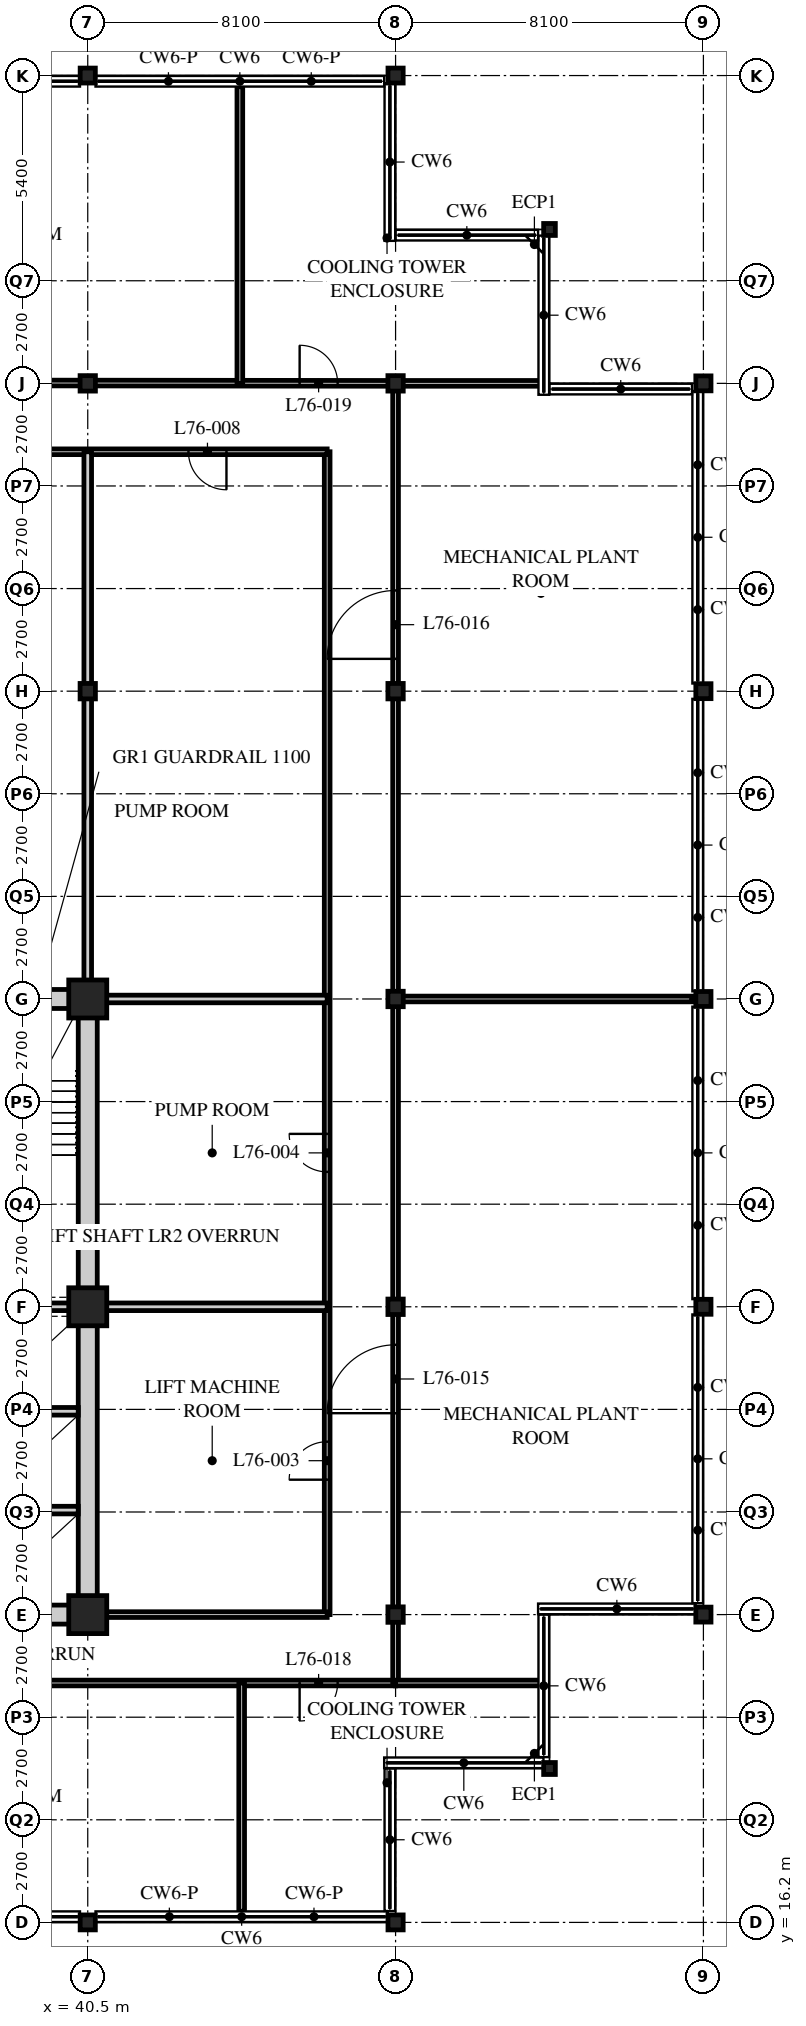
"""IFC4 building model, lengths in metres.
Left out: names, types, materials, properties, quantities, classifications, styles, units other than length and angle.
Written with IfcOpenShell. Run it as: python <this file> out.ifc"""

import sys

from ifc_helpers import new_model, si_unit, direction, frame, frame_2d, origin, origin_2d, place, context, subcontext, project, spatial, rectangle, hollow_rectangle, i_section, extrude, element, fill, save


model = new_model("IFC4")
c1 = context("Model", 3, precision=1e-05, world=origin(), true_north=direction((0.0, 1.0)))
c2 = subcontext(c1, "Body", "Model", "MODEL_VIEW")
j1 = project(units=[si_unit("LENGTHUNIT", "METRE"), si_unit("PLANEANGLEUNIT", "RADIAN")], contexts=[c1])
p1 = place(None, origin())
s1 = spatial("IfcSite", under=j1, at=p1, CompositionType="ELEMENT")
p2 = place(p1, origin())
s2 = spatial("IfcBuilding", under=s1, at=p2, CompositionType="ELEMENT")
p3 = place(p2, frame((0.0, 0.0, 298.5)))
s3 = spatial("IfcBuildingStorey", under=s2, at=p3, CompositionType="ELEMENT", Elevation=298.5)
p4 = place(p3, frame((40.5, 16.2, 0.0), z_axis=(0.0, 0.0, 1.0), x_axis=(1.0, 0.0, 0.0)))
e1 = element("IfcColumn", 1, at=p4, inside=s3, PredefinedType="COLUMN", context=c2, shape_type="SweptSolid", body=[
    extrude(i_section(OverallWidth=0.399, OverallDepth=0.394, WebThickness=0.023, FlangeThickness=0.037, FilletRadius=0.015, at=origin_2d()), origin(), (0.0, 0.0, 1.0), 5.4),
])
for number, where, z_axis, x_axis in (
    (2, (40.5, 24.3, 0.0), (0.0, 0.0, 1.0), (1.0, 0.0, 0.0)),
    (3, (40.5, 32.4, 0.0), (0.0, 0.0, 1.0), (1.0, 0.0, 0.0)),
    (4, (40.5, 40.5, 0.0), (0.0, 0.0, 1.0), (1.0, 0.0, 0.0)),
):
    element("IfcColumn", number, at=place(p3, frame(where, z_axis=z_axis, x_axis=x_axis)), inside=s3, PredefinedType="COLUMN", context=c2, shape_type="SweptSolid", body=[
        extrude(hollow_rectangle(XDim=1.0, YDim=1.0, WallThickness=0.1, at=origin_2d()), origin(), (0.0, 0.0, 1.0), 5.4),
    ])
for number, where, z_axis, x_axis in (
    (5, (40.5, 48.6, 0.0), (0.0, 0.0, 1.0), (1.0, 0.0, 0.0)),
    (6, (40.5, 56.7, 0.0), (0.0, 0.0, 1.0), (1.0, 0.0, 0.0)),
):
    element("IfcColumn", number, at=place(p3, frame(where, z_axis=z_axis, x_axis=x_axis)), inside=s3, PredefinedType="COLUMN", context=c2, shape_type="SweptSolid", body=[
        extrude(i_section(OverallWidth=0.403, OverallDepth=0.406, WebThickness=0.027, FlangeThickness=0.043, FilletRadius=0.015, at=origin_2d()), origin(), (0.0, 0.0, 1.0), 5.4),
    ])
for number, where, z_axis, x_axis in (
    (7, (40.5, 64.8, 0.0), (0.0, 0.0, 1.0), (1.0, 0.0, 0.0)),
    (8, (48.6, 16.2, 0.0), (0.0, 0.0, 1.0), (1.0, 0.0, 0.0)),
):
    element("IfcColumn", number, at=place(p3, frame(where, z_axis=z_axis, x_axis=x_axis)), inside=s3, PredefinedType="COLUMN", context=c2, shape_type="SweptSolid", body=[
        extrude(i_section(OverallWidth=0.399, OverallDepth=0.394, WebThickness=0.023, FlangeThickness=0.037, FilletRadius=0.015, at=origin_2d()), origin(), (0.0, 0.0, 1.0), 5.4),
    ])
for number, where, z_axis, x_axis in (
    (9, (48.6, 24.3, 0.0), (0.0, 0.0, 1.0), (1.0, 0.0, 0.0)),
    (10, (48.6, 32.4, 0.0), (0.0, 0.0, 1.0), (1.0, 0.0, 0.0)),
    (11, (48.6, 40.5, 0.0), (0.0, 0.0, 1.0), (1.0, 0.0, 0.0)),
    (12, (48.6, 48.6, 0.0), (0.0, 0.0, 1.0), (1.0, 0.0, 0.0)),
    (13, (48.6, 56.7, 0.0), (0.0, 0.0, 1.0), (1.0, 0.0, 0.0)),
):
    element("IfcColumn", number, at=place(p3, frame(where, z_axis=z_axis, x_axis=x_axis)), inside=s3, PredefinedType="COLUMN", context=c2, shape_type="SweptSolid", body=[
        extrude(i_section(OverallWidth=0.403, OverallDepth=0.406, WebThickness=0.027, FlangeThickness=0.043, FilletRadius=0.015, at=origin_2d()), origin(), (0.0, 0.0, 1.0), 5.4),
    ])
p5 = place(p3, frame((48.6, 64.8, 0.0), z_axis=(0.0, 0.0, 1.0), x_axis=(1.0, 0.0, 0.0)))
e14 = element("IfcColumn", 14, at=p5, inside=s3, PredefinedType="COLUMN", context=c2, shape_type="SweptSolid", body=[
    extrude(i_section(OverallWidth=0.399, OverallDepth=0.394, WebThickness=0.023, FlangeThickness=0.037, FilletRadius=0.015, at=origin_2d()), origin(), (0.0, 0.0, 1.0), 5.4),
])
for number, where, z_axis, x_axis in (
    (15, (52.65, 20.25, 0.0), (0.0, 0.0, 1.0), (1.0, 0.0, 0.0)),
    (16, (52.65, 60.75, 0.0), (0.0, 0.0, 1.0), (1.0, 0.0, 0.0)),
):
    element("IfcColumn", number, at=place(p3, frame(where, z_axis=z_axis, x_axis=x_axis)), inside=s3, PredefinedType="COLUMN", context=c2, shape_type="SweptSolid", body=[
        extrude(i_section(OverallWidth=0.307, OverallDepth=0.314, WebThickness=0.012, FlangeThickness=0.019, FilletRadius=0.015, at=origin_2d()), origin(), (0.0, 0.0, 1.0), 5.4),
    ])
for number, where, z_axis, x_axis in (
    (17, (56.7, 24.3, 0.0), (0.0, 0.0, 1.0), (1.0, 0.0, 0.0)),
    (18, (56.7, 32.4, 0.0), (0.0, 0.0, 1.0), (1.0, 0.0, 0.0)),
    (19, (56.7, 40.5, 0.0), (0.0, 0.0, 1.0), (1.0, 0.0, 0.0)),
    (20, (56.7, 48.6, 0.0), (0.0, 0.0, 1.0), (1.0, 0.0, 0.0)),
    (21, (56.7, 56.7, 0.0), (0.0, 0.0, 1.0), (1.0, 0.0, 0.0)),
):
    element("IfcColumn", number, at=place(p3, frame(where, z_axis=z_axis, x_axis=x_axis)), inside=s3, PredefinedType="COLUMN", context=c2, shape_type="SweptSolid", body=[
        extrude(i_section(OverallWidth=0.399, OverallDepth=0.394, WebThickness=0.023, FlangeThickness=0.037, FilletRadius=0.015, at=origin_2d()), origin(), (0.0, 0.0, 1.0), 5.4),
    ])
p6 = place(p3, frame((8.1, 22.5, 0.0), z_axis=(0.0, 0.0, 1.0), x_axis=(1.0, 0.0, 0.0)))
e22 = element("IfcWall", 22, at=p6, inside=s3, PredefinedType="PARTITIONING", context=c2, shape_type="SweptSolid", body=[
    extrude(rectangle(XDim=40.5, YDim=0.15, at=frame_2d((20.25, 0.0))), origin(), (0.0, 0.0, 1.0), 5.19),
])
p7 = place(p6, frame((11.25, 0.0, 0.0)))
e23 = element("IfcOpeningElement", 23, at=p7, cuts=e22, PredefinedType="OPENING", context=c2, shape_type="SweptSolid", body=[
    extrude(rectangle(XDim=1.8, YDim=2.4, at=frame_2d((0.9, 1.2))), frame((0.0, 0.085, 0.0), z_axis=(0.0, -1.0, 0.0), x_axis=(1.0, 0.0, 0.0)), (0.0, 0.0, 1.0), 0.17),
])
p8 = place(p6, frame((27.45, 0.0, 0.0)))
e24 = element("IfcOpeningElement", 24, at=p8, cuts=e22, PredefinedType="OPENING", context=c2, shape_type="SweptSolid", body=[
    extrude(rectangle(XDim=1.8, YDim=2.4, at=frame_2d((0.9, 1.2))), frame((0.0, 0.085, 0.0), z_axis=(0.0, -1.0, 0.0), x_axis=(1.0, 0.0, 0.0)), (0.0, 0.0, 1.0), 0.17),
])
p9 = place(p6, frame((1.525, 0.0, 0.0)))
e25 = element("IfcOpeningElement", 25, at=p9, cuts=e22, PredefinedType="OPENING", context=c2, shape_type="SweptSolid", body=[
    extrude(rectangle(XDim=1.0, YDim=2.1, at=frame_2d((0.5, 1.05))), frame((0.0, 0.085, 0.0), z_axis=(0.0, -1.0, 0.0), x_axis=(1.0, 0.0, 0.0)), (0.0, 0.0, 1.0), 0.17),
])
p10 = place(p6, frame((37.975, 0.0, 0.0)))
e26 = element("IfcOpeningElement", 26, at=p10, cuts=e22, PredefinedType="OPENING", context=c2, shape_type="SweptSolid", body=[
    extrude(rectangle(XDim=1.0, YDim=2.1, at=frame_2d((0.5, 1.05))), frame((0.0, 0.085, 0.0), z_axis=(0.0, -1.0, 0.0), x_axis=(1.0, 0.0, 0.0)), (0.0, 0.0, 1.0), 0.17),
])
p11 = place(p3, frame((8.1, 56.74, 0.0), z_axis=(0.0, 0.0, 1.0), x_axis=(0.999999511317, -0.000988618344, 0.0)))
e27 = element("IfcWall", 27, at=p11, inside=s3, PredefinedType="PARTITIONING", context=c2, shape_type="SweptSolid", body=[
    extrude(rectangle(XDim=40.5, YDim=0.15, at=frame_2d((20.25, 0.0))), origin(), (0.0, 0.0, 1.0), 4.428),
])
p12 = place(p11, frame((11.25, 0.0, 0.0)))
e28 = element("IfcOpeningElement", 28, at=p12, cuts=e27, PredefinedType="OPENING", context=c2, shape_type="SweptSolid", body=[
    extrude(rectangle(XDim=1.8, YDim=2.4, at=frame_2d((0.9, 1.2))), frame((0.0, 0.085, 0.0), z_axis=(0.0, -1.0, 0.0), x_axis=(1.0, 0.0, 0.0)), (0.0, 0.0, 1.0), 0.17),
])
p13 = place(p11, frame((27.45, 0.0, 0.0)))
e29 = element("IfcOpeningElement", 29, at=p13, cuts=e27, PredefinedType="OPENING", context=c2, shape_type="SweptSolid", body=[
    extrude(rectangle(XDim=1.8, YDim=2.4, at=frame_2d((0.9, 1.2))), frame((0.0, 0.085, 0.0), z_axis=(0.0, -1.0, 0.0), x_axis=(1.0, 0.0, 0.0)), (0.0, 0.0, 1.0), 0.17),
])
p14 = place(p11, frame((37.975, 0.0, 0.0)))
e30 = element("IfcOpeningElement", 30, at=p14, cuts=e27, PredefinedType="OPENING", context=c2, shape_type="SweptSolid", body=[
    extrude(rectangle(XDim=1.0, YDim=2.1, at=frame_2d((0.5, 1.05))), frame((0.0, 0.085, 0.0), z_axis=(0.0, -1.0, 0.0), x_axis=(1.0, 0.0, 0.0)), (0.0, 0.0, 1.0), 0.17),
])
p15 = place(p11, frame((1.525, 0.0, 0.0)))
e31 = element("IfcOpeningElement", 31, at=p15, cuts=e27, PredefinedType="OPENING", context=c2, shape_type="SweptSolid", body=[
    extrude(rectangle(XDim=1.0, YDim=2.1, at=frame_2d((0.5, 1.05))), frame((0.0, 0.085, 0.0), z_axis=(0.0, -1.0, 0.0), x_axis=(1.0, 0.0, 0.0)), (0.0, 0.0, 1.0), 0.17),
])
p16 = place(p3, frame((48.6, 22.5, 0.0), z_axis=(0.0, 0.0, 1.0), x_axis=(0.0, 1.0, 0.0)))
e32 = element("IfcWall", 32, at=p16, inside=s3, PredefinedType="PARTITIONING", context=c2, shape_type="SweptSolid", body=[
    extrude(rectangle(XDim=34.2, YDim=0.15, at=frame_2d((17.1, 0.0))), origin(), (0.0, 0.0, 1.0), 4.428),
])
p17 = place(p16, frame((7.1, 0.0, 0.0)))
e33 = element("IfcOpeningElement", 33, at=p17, cuts=e32, PredefinedType="OPENING", context=c2, shape_type="SweptSolid", body=[
    extrude(rectangle(XDim=1.8, YDim=2.4, at=frame_2d((0.9, 1.2))), frame((0.0, 0.085, 0.0), z_axis=(0.0, -1.0, 0.0), x_axis=(1.0, 0.0, 0.0)), (0.0, 0.0, 1.0), 0.17),
])
p18 = place(p16, frame((26.95, 0.0, 0.0)))
e34 = element("IfcOpeningElement", 34, at=p18, cuts=e32, PredefinedType="OPENING", context=c2, shape_type="SweptSolid", body=[
    extrude(rectangle(XDim=1.8, YDim=2.4, at=frame_2d((0.9, 1.2))), frame((0.0, 0.085, 0.0), z_axis=(0.0, -1.0, 0.0), x_axis=(1.0, 0.0, 0.0)), (0.0, 0.0, 1.0), 0.17),
])
p19 = place(p3, frame((46.8, 24.3, 0.0), z_axis=(0.0, 0.0, 1.0), x_axis=(0.0, 1.0, 0.0)))
e35 = element("IfcWall", 35, at=p19, inside=s3, PredefinedType="PARTITIONING", context=c2, shape_type="SweptSolid", body=[
    extrude(rectangle(XDim=30.6, YDim=0.15, at=frame_2d((15.3, 0.0))), origin(), (0.0, 0.0, 1.0), 5.19),
])
p20 = place(p19, frame((3.55, 0.0, 0.0)))
e36 = element("IfcOpeningElement", 36, at=p20, cuts=e35, PredefinedType="OPENING", context=c2, shape_type="SweptSolid", body=[
    extrude(rectangle(XDim=1.0, YDim=2.1, at=frame_2d((0.5, 1.05))), frame((0.0, 0.085, 0.0), z_axis=(0.0, -1.0, 0.0), x_axis=(1.0, 0.0, 0.0)), (0.0, 0.0, 1.0), 0.17),
])
p21 = place(p19, frame((11.65, 0.0, 0.0)))
e37 = element("IfcOpeningElement", 37, at=p21, cuts=e35, PredefinedType="OPENING", context=c2, shape_type="SweptSolid", body=[
    extrude(rectangle(XDim=1.0, YDim=2.1, at=frame_2d((0.5, 1.05))), frame((0.0, 0.085, 0.0), z_axis=(0.0, -1.0, 0.0), x_axis=(1.0, 0.0, 0.0)), (0.0, 0.0, 1.0), 0.17),
])
p22 = place(p3, frame((46.8, 54.9, 0.0), z_axis=(0.0, 0.0, 1.0), x_axis=(-1.0, 0.0, 0.0)))
e38 = element("IfcWall", 38, at=p22, inside=s3, PredefinedType="PARTITIONING", context=c2, shape_type="SweptSolid", body=[
    extrude(rectangle(XDim=17.24, YDim=0.15, at=frame_2d((8.62, 0.0))), origin(), (0.0, 0.0, 1.0), 5.19),
])
p23 = place(p22, frame((11.275, 0.0, 0.0)))
e39 = element("IfcOpeningElement", 39, at=p23, cuts=e38, PredefinedType="OPENING", context=c2, shape_type="SweptSolid", body=[
    extrude(rectangle(XDim=1.0, YDim=2.1, at=frame_2d((0.5, 1.05))), frame((0.0, 0.085, 0.0), z_axis=(0.0, -1.0, 0.0), x_axis=(1.0, 0.0, 0.0)), (0.0, 0.0, 1.0), 0.17),
])
p24 = place(p22, frame((2.65, 0.0, 0.0)))
e40 = element("IfcOpeningElement", 40, at=p24, cuts=e38, PredefinedType="OPENING", context=c2, shape_type="SweptSolid", body=[
    extrude(rectangle(XDim=1.0, YDim=2.1, at=frame_2d((0.5, 1.05))), frame((0.0, 0.085, 0.0), z_axis=(0.0, -1.0, 0.0), x_axis=(1.0, 0.0, 0.0)), (0.0, 0.0, 1.0), 0.17),
])
p25 = place(p3, frame((40.7, 24.3, 0.0), z_axis=(0.0, 0.0, 1.0), x_axis=(1.0, 0.0, 0.0)))
e41 = element("IfcWall", 41, at=p25, inside=s3, PredefinedType="PARTITIONING", context=c2, shape_type="SweptSolid", body=[
    extrude(rectangle(XDim=6.1, YDim=0.15, at=frame_2d((3.05, 0.0))), origin(), (0.0, 0.0, 1.0), 4.428),
])
p26 = place(p3, frame((40.5, 32.4, 0.0), z_axis=(0.0, 0.0, 1.0), x_axis=(1.0, 0.0, 0.0)))
e42 = element("IfcWall", 42, at=p26, inside=s3, PredefinedType="SOLIDWALL", context=c2, shape_type="SweptSolid", body=[
    extrude(rectangle(XDim=6.3, YDim=0.2, at=frame_2d((3.15, 0.0))), origin(), (0.0, 0.0, 1.0), 4.428),
])
p27 = place(p3, frame((40.5, 40.5, 0.0), z_axis=(0.0, 0.0, 1.0), x_axis=(0.0, 1.0, 0.0)))
e43 = element("IfcWall", 43, at=p27, inside=s3, PredefinedType="SOLIDWALL", context=c2, shape_type="SweptSolid", body=[
    extrude(rectangle(XDim=14.4, YDim=0.2, at=frame_2d((7.2, 0.0))), origin(), (0.0, 0.0, 1.0), 4.428),
])
p28 = place(p3, frame((40.5, 40.5, 0.0), z_axis=(0.0, 0.0, 1.0), x_axis=(1.0, 0.0, 0.0)))
e44 = element("IfcWall", 44, at=p28, inside=s3, PredefinedType="SOLIDWALL", context=c2, shape_type="SweptSolid", body=[
    extrude(rectangle(XDim=6.3, YDim=0.2, at=frame_2d((3.15, 0.0))), origin(), (0.0, 0.0, 1.0), 4.428),
])
p29 = place(p3, frame((48.6, 40.5, 0.0), z_axis=(0.0, 0.0, 1.0), x_axis=(1.0, 0.0, 0.0)))
e45 = element("IfcWall", 45, at=p29, inside=s3, PredefinedType="PARTITIONING", context=c2, shape_type="SweptSolid", body=[
    extrude(rectangle(XDim=7.8, YDim=0.15, at=frame_2d((3.9, 0.0))), origin(), (0.0, 0.0, 1.0), 4.428),
])
p30 = place(p3, frame((48.6, 22.5, 0.0), z_axis=(0.0, 0.0, 1.0), x_axis=(1.0, 0.0, 0.0)))
e46 = element("IfcWall", 46, at=p30, inside=s3, PredefinedType="PARTITIONING", context=c2, shape_type="SweptSolid", body=[
    extrude(rectangle(XDim=3.877, YDim=0.15, at=frame_2d((1.938, 0.0))), origin(), (0.0, 0.0, 1.0), 5.19),
])
p31 = place(p3, frame((44.55, 22.5, 0.0), z_axis=(0.0, 0.0, 1.0), x_axis=(0.0, -1.0, 0.0)))
e47 = element("IfcWall", 47, at=p31, inside=s3, PredefinedType="PARTITIONING", context=c2, shape_type="SweptSolid", body=[
    extrude(rectangle(XDim=6.007, YDim=0.15, at=frame_2d((3.003, 0.0))), origin(), (0.0, 0.0, 1.0), 5.19),
])
p32 = place(p3, frame((48.6, 56.7, 0.0), z_axis=(0.0, 0.0, 1.0), x_axis=(1.0, 0.0, 0.0)))
e48 = element("IfcWall", 48, at=p32, inside=s3, PredefinedType="PARTITIONING", context=c2, shape_type="SweptSolid", body=[
    extrude(rectangle(XDim=3.877, YDim=0.15, at=frame_2d((1.938, 0.0))), origin(), (0.0, 0.0, 1.0), 4.428),
])
p33 = place(p3, frame((44.502, 56.7, 0.0), z_axis=(0.0, 0.0, 1.0), x_axis=(0.0, 1.0, 0.0)))
e49 = element("IfcWall", 49, at=p33, inside=s3, PredefinedType="PARTITIONING", context=c2, shape_type="SweptSolid", body=[
    extrude(rectangle(XDim=7.807, YDim=0.15, at=frame_2d((3.904, 0.0))), origin(), (0.0, 0.0, 1.0), 5.19),
])
p34 = place(p3, frame((15.95, 24.3, 0.0), z_axis=(0.0, 0.0, 1.0), x_axis=(1.0, 0.0, 0.0)))
e50 = element("IfcWall", 50, at=p34, inside=s3, PredefinedType="SOLIDWALL", context=c2, shape_type="SweptSolid", body=[
    extrude(rectangle(XDim=24.8, YDim=0.5, at=frame_2d((12.4, 0.0))), origin(), (0.0, 0.0, 1.0), 4.428),
])
p35 = place(p34, frame((11.5, 0.0, 0.0)))
e51 = element("IfcOpeningElement", 51, at=p35, cuts=e50, PredefinedType="OPENING", context=c2, shape_type="SweptSolid", body=[
    extrude(rectangle(XDim=1.8, YDim=2.4, at=frame_2d((0.9, 1.2))), frame((0.0, 0.26, 0.0), z_axis=(0.0, -1.0, 0.0), x_axis=(1.0, 0.0, 0.0)), (0.0, 0.0, 1.0), 0.52),
])
p36 = place(p3, frame((15.95, 40.5, 0.0), z_axis=(0.0, 0.0, 1.0), x_axis=(1.0, 0.0, 0.0)))
e52 = element("IfcWall", 52, at=p36, inside=s3, PredefinedType="SOLIDWALL", context=c2, shape_type="SweptSolid", body=[
    extrude(rectangle(XDim=24.8, YDim=0.5, at=frame_2d((12.4, 0.0))), origin(), (0.0, 0.0, 1.0), 4.428),
])
p37 = place(p36, frame((11.5, 0.0, 0.0)))
e53 = element("IfcOpeningElement", 53, at=p37, cuts=e52, PredefinedType="OPENING", context=c2, shape_type="SweptSolid", body=[
    extrude(rectangle(XDim=1.8, YDim=2.4, at=frame_2d((0.9, 1.2))), frame((0.0, 0.26, 0.0), z_axis=(0.0, -1.0, 0.0), x_axis=(1.0, 0.0, 0.0)), (0.0, 0.0, 1.0), 0.52),
])
p38 = place(p3, frame((40.5, 24.55, 0.0), z_axis=(0.0, 0.0, 1.0), x_axis=(0.0, 1.0, 0.0)))
e54 = element("IfcWall", 54, at=p38, inside=s3, PredefinedType="SOLIDWALL", context=c2, shape_type="SweptSolid", body=[
    extrude(rectangle(XDim=15.7, YDim=0.5, at=frame_2d((7.85, 0.0))), origin(), (0.0, 0.0, 1.0), 4.428),
])
p39 = place(p3, frame((32.3, 32.4, 0.0), z_axis=(0.0, 0.0, 1.0), x_axis=(1.0, 0.0, 0.0)))
e55 = element("IfcWall", 55, at=p39, inside=s3, PredefinedType="SOLIDWALL", context=c2, shape_type="SweptSolid", body=[
    extrude(rectangle(XDim=7.95, YDim=0.2, at=frame_2d((3.975, 0.0))), origin(), (0.0, 0.0, 1.0), 4.428),
])
for number, where, z_axis, x_axis in (
    (56, (37.65, 27.05, 0.0), (0.0, 0.0, 1.0), (1.0, 0.0, 0.0)),
    (57, (37.65, 29.65, 0.0), (0.0, 0.0, 1.0), (1.0, 0.0, 0.0)),
):
    element("IfcWall", number, at=place(p3, frame(where, z_axis=z_axis, x_axis=x_axis)), inside=s3, PredefinedType="SOLIDWALL", context=c2, shape_type="SweptSolid", body=[
        extrude(rectangle(XDim=2.6, YDim=0.2, at=frame_2d((1.3, 0.0))), origin(), (0.0, 0.0, 1.0), 5.19),
    ])
p40 = place(p20, origin())
e58 = element("IfcDoor", 58, at=p40, inside=s3, OperationType="SINGLE_SWING_LEFT", PredefinedType="DOOR", context=c2, shape_type="SweptSolid", body=[
    extrude(rectangle(XDim=1.0, YDim=2.1, at=frame_2d((0.5, 1.05))), frame((0.0, 0.025, 0.0), z_axis=(0.0, -1.0, 0.0), x_axis=(1.0, 0.0, 0.0)), (0.0, 0.0, 1.0), 0.05),
])
fill(e36, e58)
p41 = place(p21, origin())
e59 = element("IfcDoor", 59, at=p41, inside=s3, OperationType="SINGLE_SWING_RIGHT", PredefinedType="DOOR", context=c2, shape_type="SweptSolid", body=[
    extrude(rectangle(XDim=1.0, YDim=2.1, at=frame_2d((0.5, 1.05))), frame((0.0, 0.025, 0.0), z_axis=(0.0, -1.0, 0.0), x_axis=(1.0, 0.0, 0.0)), (0.0, 0.0, 1.0), 0.05),
])
fill(e37, e59)
p42 = place(p24, origin())
e60 = element("IfcDoor", 60, at=p42, inside=s3, OperationType="SINGLE_SWING_LEFT", PredefinedType="DOOR", context=c2, shape_type="SweptSolid", body=[
    extrude(rectangle(XDim=1.0, YDim=2.1, at=frame_2d((0.5, 1.05))), frame((0.0, 0.025, 0.0), z_axis=(0.0, -1.0, 0.0), x_axis=(1.0, 0.0, 0.0)), (0.0, 0.0, 1.0), 0.05),
])
fill(e40, e60)
p43 = place(p17, origin())
e61 = element("IfcDoor", 61, at=p43, inside=s3, OperationType="DOUBLE_DOOR_SINGLE_SWING", PredefinedType="DOOR", context=c2, shape_type="SweptSolid", body=[
    extrude(rectangle(XDim=1.8, YDim=2.4, at=frame_2d((0.9, 1.2))), frame((0.0, 0.025, 0.0), z_axis=(0.0, -1.0, 0.0), x_axis=(1.0, 0.0, 0.0)), (0.0, 0.0, 1.0), 0.05),
])
fill(e33, e61)
p44 = place(p18, origin())
e62 = element("IfcDoor", 62, at=p44, inside=s3, OperationType="DOUBLE_DOOR_SINGLE_SWING", PredefinedType="DOOR", context=c2, shape_type="SweptSolid", body=[
    extrude(rectangle(XDim=1.8, YDim=2.4, at=frame_2d((0.9, 1.2))), frame((0.0, 0.025, 0.0), z_axis=(0.0, -1.0, 0.0), x_axis=(1.0, 0.0, 0.0)), (0.0, 0.0, 1.0), 0.05),
])
fill(e34, e62)
p45 = place(p10, origin())
e63 = element("IfcDoor", 63, at=p45, inside=s3, OperationType="SINGLE_SWING_RIGHT", PredefinedType="DOOR", context=c2, shape_type="SweptSolid", body=[
    extrude(rectangle(XDim=1.0, YDim=2.1, at=frame_2d((0.5, 1.05))), frame((0.0, 0.025, 0.0), z_axis=(0.0, -1.0, 0.0), x_axis=(1.0, 0.0, 0.0)), (0.0, 0.0, 1.0), 0.05),
])
fill(e26, e63)
p46 = place(p14, origin())
e64 = element("IfcDoor", 64, at=p46, inside=s3, OperationType="SINGLE_SWING_LEFT", PredefinedType="DOOR", context=c2, shape_type="SweptSolid", body=[
    extrude(rectangle(XDim=1.0, YDim=2.1, at=frame_2d((0.5, 1.05))), frame((0.0, 0.025, 0.0), z_axis=(0.0, -1.0, 0.0), x_axis=(1.0, 0.0, 0.0)), (0.0, 0.0, 1.0), 0.05),
])
fill(e30, e64)
save(model, sys.argv[1])
